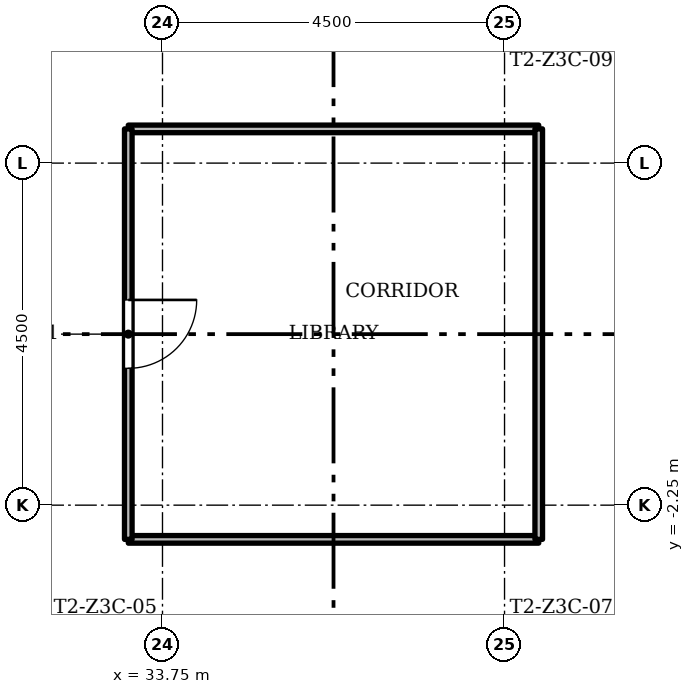
"""IFC4 building model, lengths in metres.
Left out: names, types, materials, properties, quantities, classifications, styles, units other than length and angle.
Written with IfcOpenShell. Run it as: python <this file> out.ifc"""

import sys

from ifc_helpers import new_model, si_unit, direction, frame, frame_2d, origin, place, context, subcontext, project, spatial, rectangle, extrude, element, fill, save


model = new_model("IFC4")
c1 = context("Model", 3, precision=1e-05, world=origin(), true_north=direction((0.0, 1.0)))
c2 = subcontext(c1, "Body", "Model", "MODEL_VIEW")
j1 = project(units=[si_unit("LENGTHUNIT", "METRE"), si_unit("PLANEANGLEUNIT", "RADIAN")], contexts=[c1])
p1 = place(None, origin())
s1 = spatial("IfcSite", under=j1, at=p1, CompositionType="ELEMENT")
p2 = place(p1, origin())
s2 = spatial("IfcBuilding", under=s1, at=p2, CompositionType="ELEMENT")
p3 = place(p2, frame((0.0, 0.0, 157.5)))
s3 = spatial("IfcBuildingStorey", under=s2, at=p3, CompositionType="ELEMENT", Elevation=157.5)
for number, where, z_axis, x_axis in (
    (1, (38.7, -2.7, 0.0), (0.0, 0.0, 1.0), (-1.0, 0.0, 0.0)),
    (2, (38.7, 2.7, 0.0), (0.0, 0.0, 1.0), (-1.0, 0.0, 0.0)),
    (3, (38.7, -2.7, 0.0), (0.0, 0.0, 1.0), (0.0, 1.0, 0.0)),
):
    element("IfcWall", number, at=place(p3, frame(where, z_axis=z_axis, x_axis=x_axis)), inside=s3, PredefinedType="PARTITIONING", context=c2, shape_type="SweptSolid", body=[
        extrude(rectangle(XDim=5.4, YDim=0.1, at=frame_2d((2.7, 0.0))), origin(), (0.0, 0.0, 1.0), 3.0),
    ])
p4 = place(p3, frame((33.3, -2.7, 0.0), z_axis=(0.0, 0.0, 1.0), x_axis=(0.0, 1.0, 0.0)))
e4 = element("IfcWall", 4, at=p4, inside=s3, PredefinedType="PARTITIONING", context=c2, shape_type="SweptSolid", body=[
    extrude(rectangle(XDim=5.4, YDim=0.1, at=frame_2d((2.7, 0.0))), origin(), (0.0, 0.0, 1.0), 3.0),
])
p5 = place(p4, frame((2.25, 0.0, 0.0)))
e5 = element("IfcOpeningElement", 5, at=p5, cuts=e4, PredefinedType="OPENING", context=c2, shape_type="SweptSolid", body=[
    extrude(rectangle(XDim=0.9, YDim=2.1, at=frame_2d((0.45, 1.05))), frame((0.0, 0.06, 0.0), z_axis=(0.0, -1.0, 0.0), x_axis=(1.0, 0.0, 0.0)), (0.0, 0.0, 1.0), 0.12),
])
p6 = place(p5, origin())
e6 = element("IfcDoor", 6, at=p6, inside=s3, OperationType="SINGLE_SWING_RIGHT", PredefinedType="DOOR", context=c2, shape_type="SweptSolid", body=[
    extrude(rectangle(XDim=0.9, YDim=2.1, at=frame_2d((0.45, 1.05))), frame((0.0, 0.025, 0.0), z_axis=(0.0, -1.0, 0.0), x_axis=(1.0, 0.0, 0.0)), (0.0, 0.0, 1.0), 0.05),
])
fill(e5, e6)
save(model, sys.argv[1])
